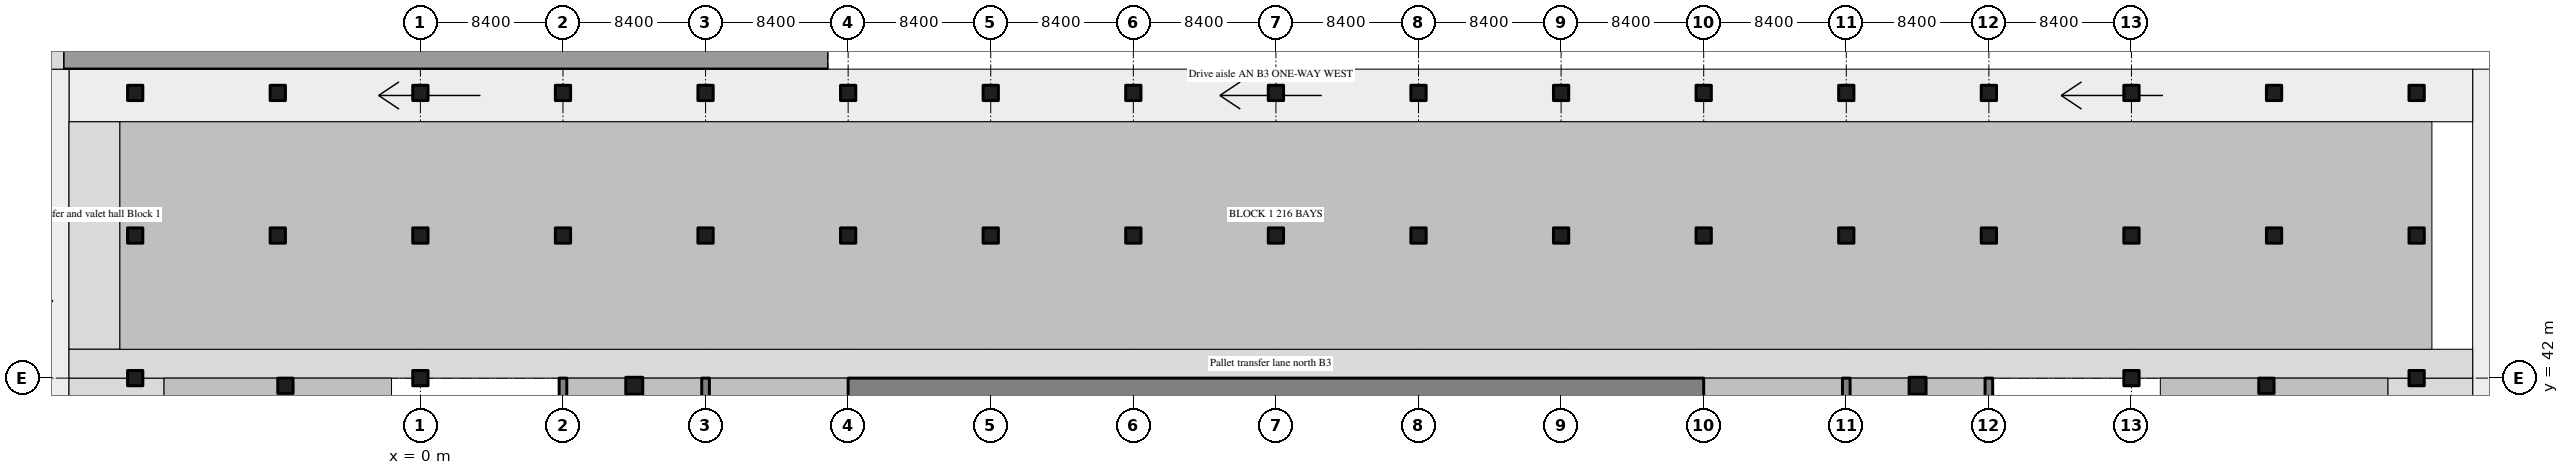
"""IFC4 building model, lengths in metres.
Left out: names, types, materials, properties, quantities, classifications, styles, units other than length and angle.
Written with IfcOpenShell. Run it as: python <this file> out.ifc"""

import sys

from ifc_helpers import new_model, si_unit, direction, frame, frame_2d, origin, origin_2d, place, context, subcontext, project, spatial, rectangle, extrude, source, transform, mapped, element, save


model = new_model("IFC4")
c1 = context("Model", 3, precision=1e-05, world=origin(), true_north=direction((0.0, 1.0)))
c2 = subcontext(c1, "Body", "Model", "MODEL_VIEW")
j1 = project(units=[si_unit("LENGTHUNIT", "METRE"), si_unit("PLANEANGLEUNIT", "RADIAN")], contexts=[c1])
p1 = place(None, origin())
s1 = spatial("IfcSite", under=j1, at=p1, CompositionType="ELEMENT")
p2 = place(p1, origin())
s2 = spatial("IfcBuilding", under=s1, at=p2, CompositionType="ELEMENT")
p3 = place(p2, frame((0.0, 0.0, -13.5)))
s3 = spatial("IfcBuildingStorey", under=s2, at=p3, CompositionType="ELEMENT", Elevation=-13.5)
m1 = source(origin(), c2, "Body", "SweptSolid", [
    extrude(rectangle(XDim=50.4, YDim=1.1, at=frame_2d((25.2, 0.0))), origin(), (0.0, 0.0, 1.0), 4.52),
])
p4 = place(p3, frame((25.2, 41.45, -0.3), z_axis=(0.0, 0.0, 1.0), x_axis=(1.0, 0.0, 0.0)))
e1 = element("IfcWall", 1, at=p4, inside=s3, PredefinedType="SHEAR", context=c2, shape_type="MappedRepresentation", body=[
    mapped(m1, transform((0.0, 0.0, 0.0), scale=1.0)),
])
m2 = source(origin(), c2, "Body", "SweptSolid", [
    extrude(rectangle(XDim=20.0, YDim=0.45, at=frame_2d((10.0, 0.0))), origin(), (0.0, 0.0, 1.0), 4.52),
])
for number, where, z_axis, x_axis in (
    (2, (8.4, 22.0, -0.3), (0.0, 0.0, 1.0), (0.0, 1.0, 0.0)),
    (3, (16.8, 22.0, -0.3), (0.0, 0.0, 1.0), (0.0, 1.0, 0.0)),
    (4, (84.0, 22.0, -0.3), (0.0, 0.0, 1.0), (0.0, 1.0, 0.0)),
    (5, (92.4, 22.0, -0.3), (0.0, 0.0, 1.0), (0.0, 1.0, 0.0)),
):
    element("IfcWall", number, at=place(p3, frame(where, z_axis=z_axis, x_axis=x_axis)), inside=s3, PredefinedType="SHEAR", context=c2, shape_type="MappedRepresentation", body=[
        mapped(m2, transform((0.0, 0.0, 0.0), scale=1.0)),
    ])
m3 = source(origin(), c2, "Body", "SweptSolid", [
    extrude(rectangle(XDim=1.0, YDim=1.0, at=origin_2d()), origin(), (0.0, 0.0, 1.0), 4.52),
])
for number, where, z_axis, x_axis in (
    (6, (12.6, 41.55, -0.3), (0.0, 0.0, 1.0), (1.0, 0.0, 0.0)),
    (7, (88.2, 41.55, -0.3), (0.0, 0.0, 1.0), (1.0, 0.0, 0.0)),
):
    element("IfcColumn", number, at=place(p3, frame(where, z_axis=z_axis, x_axis=x_axis)), inside=s3, PredefinedType="COLUMN", context=c2, shape_type="MappedRepresentation", body=[
        mapped(m3, transform((0.0, 0.0, 0.0), scale=1.0)),
    ])
m4 = source(origin(), c2, "Body", "SweptSolid", [
    extrude(rectangle(XDim=0.9, YDim=0.9, at=origin_2d()), origin(), (0.0, 0.0, 1.0), 4.52),
])
for number, where, z_axis, x_axis in (
    (8, (-7.95, 41.55, -0.3), (0.0, 0.0, 1.0), (1.0, 0.0, 0.0)),
    (9, (108.75, 41.55, -0.3), (0.0, 0.0, 1.0), (1.0, 0.0, 0.0)),
    (10, (-16.8, 42.0, -0.3), (0.0, 0.0, 1.0), (1.0, 0.0, 0.0)),
    (11, (-16.8, 50.4, -0.3), (0.0, 0.0, 1.0), (1.0, 0.0, 0.0)),
    (12, (-16.8, 58.8, -0.3), (0.0, 0.0, 1.0), (1.0, 0.0, 0.0)),
    (13, (-8.4, 50.4, -0.3), (0.0, 0.0, 1.0), (1.0, 0.0, 0.0)),
    (14, (-8.4, 58.8, -0.3), (0.0, 0.0, 1.0), (1.0, 0.0, 0.0)),
    (15, (0.0, 42.0, -0.3), (0.0, 0.0, 1.0), (1.0, 0.0, 0.0)),
    (16, (0.0, 50.4, -0.3), (0.0, 0.0, 1.0), (1.0, 0.0, 0.0)),
    (17, (0.0, 58.8, -0.3), (0.0, 0.0, 1.0), (1.0, 0.0, 0.0)),
    (18, (8.4, 50.4, -0.3), (0.0, 0.0, 1.0), (1.0, 0.0, 0.0)),
    (19, (8.4, 58.8, -0.3), (0.0, 0.0, 1.0), (1.0, 0.0, 0.0)),
    (20, (16.8, 50.4, -0.3), (0.0, 0.0, 1.0), (1.0, 0.0, 0.0)),
    (21, (16.8, 58.8, -0.3), (0.0, 0.0, 1.0), (1.0, 0.0, 0.0)),
    (22, (25.2, 50.4, -0.3), (0.0, 0.0, 1.0), (1.0, 0.0, 0.0)),
    (23, (25.2, 58.8, -0.3), (0.0, 0.0, 1.0), (1.0, 0.0, 0.0)),
    (24, (33.6, 50.4, -0.3), (0.0, 0.0, 1.0), (1.0, 0.0, 0.0)),
    (25, (33.6, 58.8, -0.3), (0.0, 0.0, 1.0), (1.0, 0.0, 0.0)),
    (26, (42.0, 50.4, -0.3), (0.0, 0.0, 1.0), (1.0, 0.0, 0.0)),
    (27, (42.0, 58.8, -0.3), (0.0, 0.0, 1.0), (1.0, 0.0, 0.0)),
    (28, (50.4, 50.4, -0.3), (0.0, 0.0, 1.0), (1.0, 0.0, 0.0)),
    (29, (50.4, 58.8, -0.3), (0.0, 0.0, 1.0), (1.0, 0.0, 0.0)),
    (30, (58.8, 50.4, -0.3), (0.0, 0.0, 1.0), (1.0, 0.0, 0.0)),
    (31, (58.8, 58.8, -0.3), (0.0, 0.0, 1.0), (1.0, 0.0, 0.0)),
    (32, (67.2, 50.4, -0.3), (0.0, 0.0, 1.0), (1.0, 0.0, 0.0)),
    (33, (67.2, 58.8, -0.3), (0.0, 0.0, 1.0), (1.0, 0.0, 0.0)),
    (34, (75.6, 50.4, -0.3), (0.0, 0.0, 1.0), (1.0, 0.0, 0.0)),
    (35, (75.6, 58.8, -0.3), (0.0, 0.0, 1.0), (1.0, 0.0, 0.0)),
    (36, (84.0, 50.4, -0.3), (0.0, 0.0, 1.0), (1.0, 0.0, 0.0)),
    (37, (84.0, 58.8, -0.3), (0.0, 0.0, 1.0), (1.0, 0.0, 0.0)),
    (38, (92.4, 50.4, -0.3), (0.0, 0.0, 1.0), (1.0, 0.0, 0.0)),
    (39, (92.4, 58.8, -0.3), (0.0, 0.0, 1.0), (1.0, 0.0, 0.0)),
    (40, (100.8, 42.0, -0.3), (0.0, 0.0, 1.0), (1.0, 0.0, 0.0)),
    (41, (100.8, 50.4, -0.3), (0.0, 0.0, 1.0), (1.0, 0.0, 0.0)),
    (42, (100.8, 58.8, -0.3), (0.0, 0.0, 1.0), (1.0, 0.0, 0.0)),
    (43, (109.2, 50.4, -0.3), (0.0, 0.0, 1.0), (1.0, 0.0, 0.0)),
    (44, (109.2, 58.8, -0.3), (0.0, 0.0, 1.0), (1.0, 0.0, 0.0)),
    (45, (117.6, 42.0, -0.3), (0.0, 0.0, 1.0), (1.0, 0.0, 0.0)),
    (46, (117.6, 50.4, -0.3), (0.0, 0.0, 1.0), (1.0, 0.0, 0.0)),
    (47, (117.6, 58.8, -0.3), (0.0, 0.0, 1.0), (1.0, 0.0, 0.0)),
):
    element("IfcColumn", number, at=place(p3, frame(where, z_axis=z_axis, x_axis=x_axis)), inside=s3, PredefinedType="COLUMN", context=c2, shape_type="MappedRepresentation", body=[
        mapped(m4, transform((0.0, 0.0, 0.0), scale=1.0)),
    ])
save(model, sys.argv[1])
